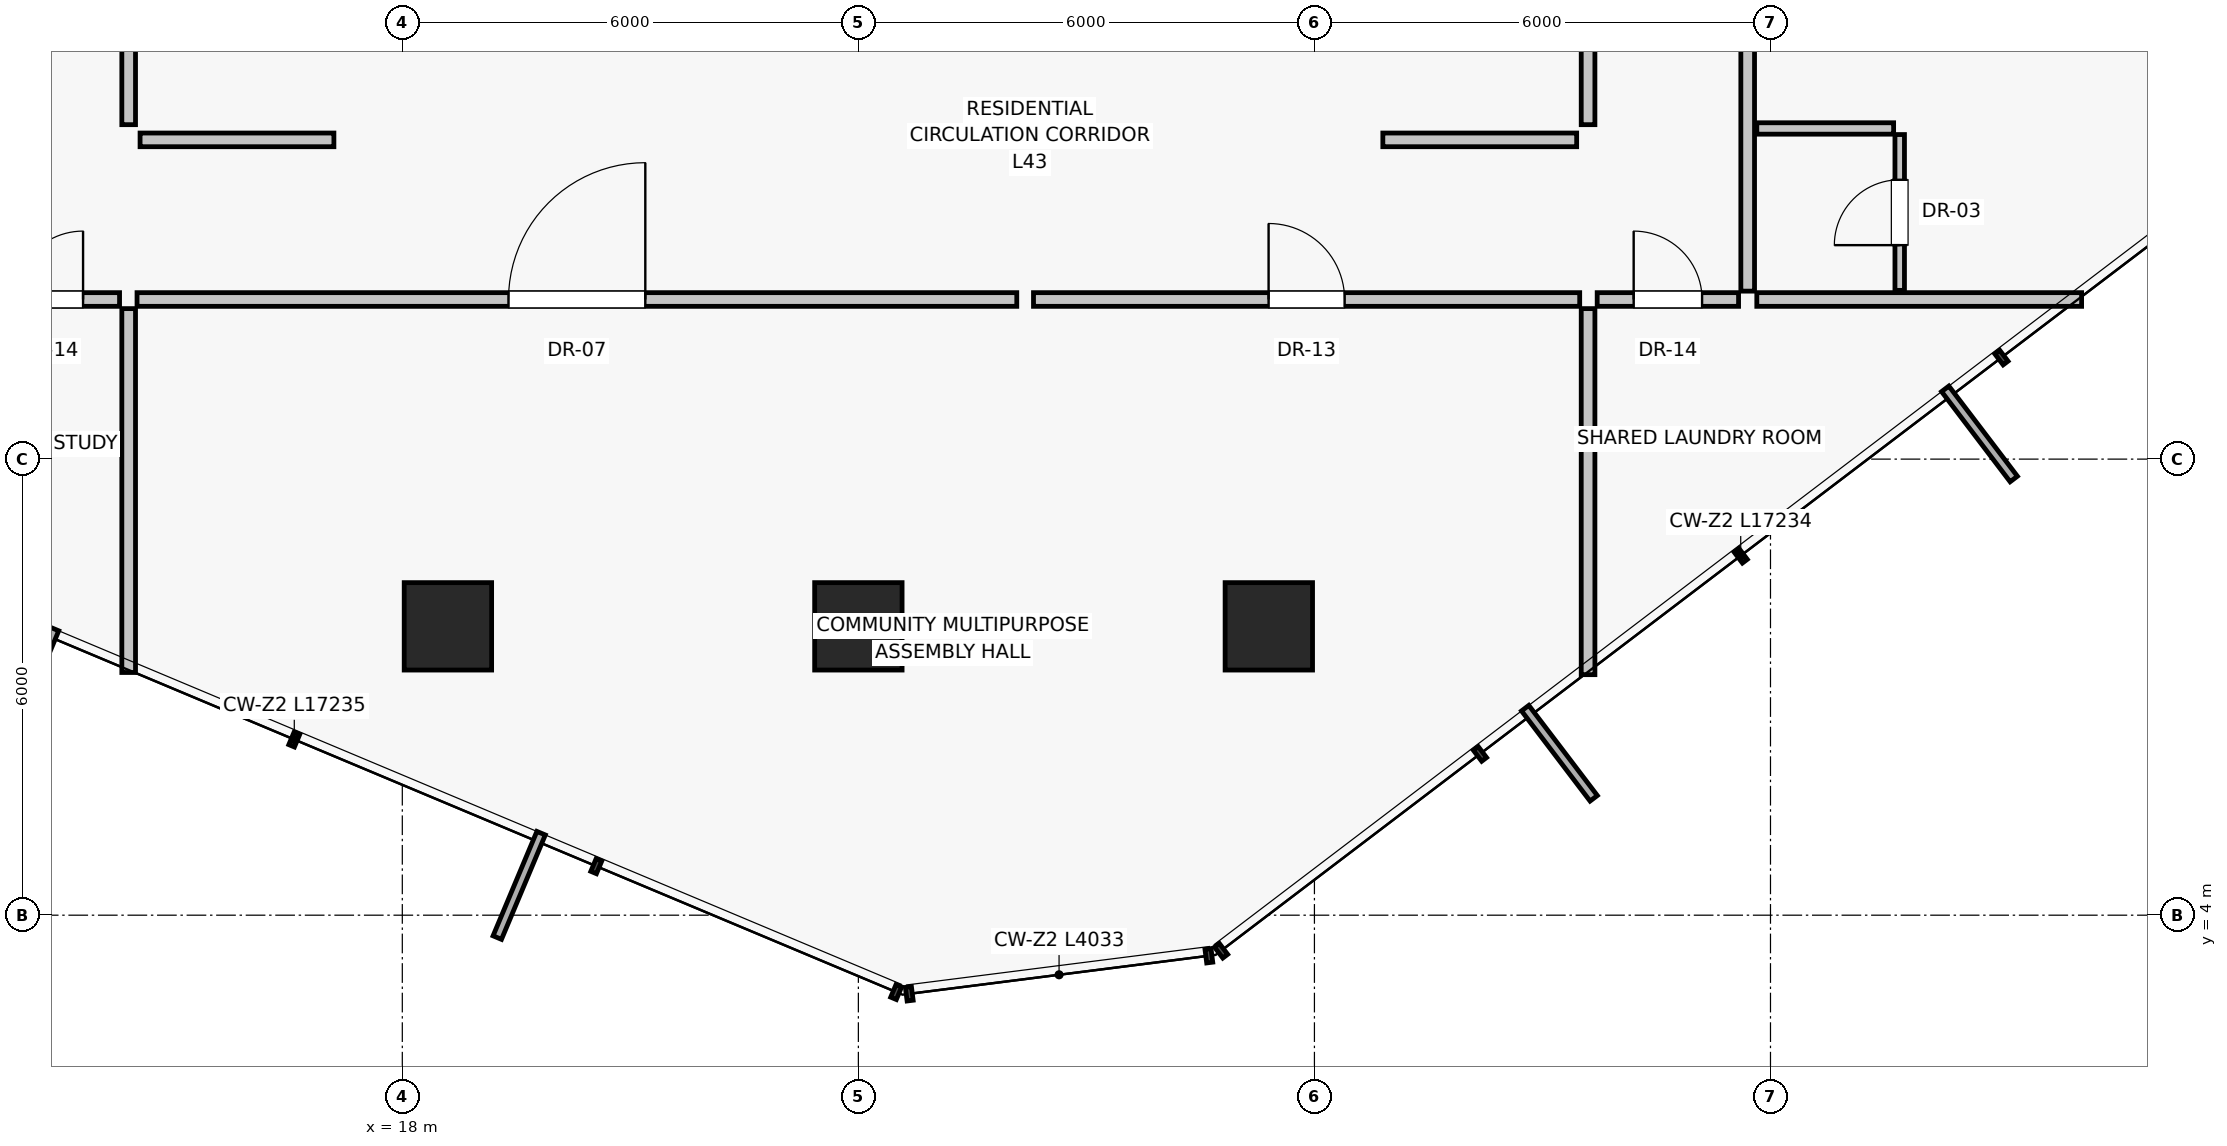
"""IFC4 building model, lengths in metres.
Left out: names, types, materials, properties, quantities, classifications, styles, units other than length and angle.
Written with IfcOpenShell. Run it as: python <this file> out.ifc"""

import sys

from ifc_helpers import new_model, si_unit, direction, frame, frame_2d, origin, origin_2d, place, context, subcontext, project, spatial, rectangle, extrude, source, transform, mapped, element, fill, save


model = new_model("IFC4")
c1 = context("Model", 3, precision=1e-05, world=origin(), true_north=direction((0.0, 1.0)))
c2 = subcontext(c1, "Body", "Model", "MODEL_VIEW")
j1 = project(units=[si_unit("LENGTHUNIT", "METRE"), si_unit("PLANEANGLEUNIT", "RADIAN")], contexts=[c1])
p1 = place(None, origin())
s1 = spatial("IfcSite", under=j1, at=p1, CompositionType="ELEMENT")
p2 = place(p1, origin())
s2 = spatial("IfcBuilding", under=s1, at=p2, CompositionType="ELEMENT")
p3 = place(p2, frame((0.0, 0.0, 152.25)))
s3 = spatial("IfcBuildingStorey", under=s2, at=p3, CompositionType="ELEMENT", Elevation=152.25)
for number, where, z_axis, x_axis in (
    (1, (18.6, 7.8, 0.0), (0.0, 0.0, 1.0), (1.0, 0.0, 0.0)),
    (2, (24.0, 7.8, 0.0), (0.0, 0.0, 1.0), (1.0, 0.0, 0.0)),
    (3, (29.4, 7.8, 0.0), (0.0, 0.0, 1.0), (1.0, 0.0, 0.0)),
):
    element("IfcColumn", number, at=place(p3, frame(where, z_axis=z_axis, x_axis=x_axis)), inside=s3, PredefinedType="COLUMN", context=c2, shape_type="SweptSolid", body=[
        extrude(rectangle(XDim=1.15, YDim=1.15, at=origin_2d()), origin(), (0.0, 0.0, 1.0), 3.25),
    ])
p4 = place(p3, frame((14.4, 14.4, 0.0), z_axis=(0.0, 0.0, 1.0), x_axis=(0.0, 1.0, 0.0)))
e4 = element("IfcWall", 4, at=p4, inside=s3, PredefinedType="PARTITIONING", context=c2, shape_type="SweptSolid", body=[
    extrude(rectangle(XDim=9.4, YDim=0.18, at=frame_2d((4.7, 0.0))), origin(), (0.0, 0.0, 1.0), 3.0),
])
p5 = place(p4, frame((3.8, 0.0, 0.0)))
e5 = element("IfcOpeningElement", 5, at=p5, cuts=e4, PredefinedType="OPENING", context=c2, shape_type="SweptSolid", body=[
    extrude(rectangle(XDim=0.9, YDim=2.01, at=frame_2d((0.45, 1.005))), frame((0.0, 0.1, 0.0), z_axis=(0.0, -1.0, 0.0), x_axis=(1.0, 0.0, 0.0)), (0.0, 0.0, 1.0), 0.2),
])
p6 = place(p3, frame((33.6, 14.4, 0.0), z_axis=(0.0, 0.0, 1.0), x_axis=(0.0, 1.0, 0.0)))
e6 = element("IfcWall", 6, at=p6, inside=s3, PredefinedType="PARTITIONING", context=c2, shape_type="SweptSolid", body=[
    extrude(rectangle(XDim=9.4, YDim=0.18, at=frame_2d((4.7, 0.0))), origin(), (0.0, 0.0, 1.0), 3.0),
])
p7 = place(p6, frame((3.8, 0.0, 0.0)))
e7 = element("IfcOpeningElement", 7, at=p7, cuts=e6, PredefinedType="OPENING", context=c2, shape_type="SweptSolid", body=[
    extrude(rectangle(XDim=0.9, YDim=2.01, at=frame_2d((0.45, 1.005))), frame((0.0, 0.1, 0.0), z_axis=(0.0, -1.0, 0.0), x_axis=(1.0, 0.0, 0.0)), (0.0, 0.0, 1.0), 0.2),
])
for number, where, z_axis, x_axis in (
    (8, (14.55, 14.2, 0.0), (0.0, 0.0, 1.0), (1.0, 0.0, 0.0)),
    (9, (30.9, 14.2, 0.0), (0.0, 0.0, 1.0), (1.0, 0.0, 0.0)),
):
    element("IfcWall", number, at=place(p3, frame(where, z_axis=z_axis, x_axis=x_axis)), inside=s3, PredefinedType="PARTITIONING", context=c2, shape_type="SweptSolid", body=[
        extrude(rectangle(XDim=2.55, YDim=0.18, at=frame_2d((1.275, 0.0))), origin(), (0.0, 0.0, 1.0), 3.0),
    ])
p8 = place(p3, frame((14.4, 11.98, 0.0), z_axis=(0.0, 0.0, 1.0), x_axis=(0.0, -1.0, 0.0)))
e10 = element("IfcWall", 10, at=p8, inside=s3, PredefinedType="PARTITIONING", context=c2, shape_type="SweptSolid", body=[
    extrude(rectangle(XDim=4.787, YDim=0.18, at=frame_2d((2.394, 0.0))), origin(), (0.0, 0.0, 1.0), 3.0),
])
p9 = place(p3, frame((33.6, 11.98, 0.0), z_axis=(0.0, 0.0, 1.0), x_axis=(0.0, -1.0, 0.0)))
e11 = element("IfcWall", 11, at=p9, inside=s3, PredefinedType="PARTITIONING", context=c2, shape_type="SweptSolid", body=[
    extrude(rectangle(XDim=4.816, YDim=0.18, at=frame_2d((2.408, 0.0))), origin(), (0.0, 0.0, 1.0), 3.0),
])
p10 = place(p3, frame((14.51, 12.1, 0.0), z_axis=(0.0, 0.0, 1.0), x_axis=(1.0, 0.0, 0.0)))
e12 = element("IfcWall", 12, at=p10, inside=s3, PredefinedType="PARTITIONING", context=c2, shape_type="SweptSolid", body=[
    extrude(rectangle(XDim=11.574, YDim=0.18, at=frame_2d((5.787, 0.0))), origin(), (0.0, 0.0, 1.0), 2.58),
])
p11 = place(p10, frame((4.887, 0.0, 0.0)))
e13 = element("IfcOpeningElement", 13, at=p11, cuts=e12, PredefinedType="OPENING", context=c2, shape_type="SweptSolid", body=[
    extrude(rectangle(XDim=1.8, YDim=2.25, at=frame_2d((0.9, 1.125))), frame((0.0, 0.1, 0.0), z_axis=(0.0, -1.0, 0.0), x_axis=(1.0, 0.0, 0.0)), (0.0, 0.0, 1.0), 0.2),
])
p12 = place(p3, frame((26.304, 12.1, 0.0), z_axis=(0.0, 0.0, 1.0), x_axis=(1.0, 0.0, 0.0)))
e14 = element("IfcWall", 14, at=p12, inside=s3, PredefinedType="PARTITIONING", context=c2, shape_type="SweptSolid", body=[
    extrude(rectangle(XDim=7.186, YDim=0.18, at=frame_2d((3.593, 0.0))), origin(), (0.0, 0.0, 1.0), 2.58),
])
p13 = place(p12, frame((3.093, 0.0, 0.0)))
e15 = element("IfcOpeningElement", 15, at=p13, cuts=e14, PredefinedType="OPENING", context=c2, shape_type="SweptSolid", body=[
    extrude(rectangle(XDim=1.0, YDim=2.01, at=frame_2d((0.5, 1.005))), frame((0.0, 0.1, 0.0), z_axis=(0.0, -1.0, 0.0), x_axis=(1.0, 0.0, 0.0)), (0.0, 0.0, 1.0), 0.2),
])
p14 = place(p3, frame((35.82, 12.1, 0.0), z_axis=(0.0, 0.0, 1.0), x_axis=(1.0, 0.0, 0.0)))
e16 = element("IfcWall", 16, at=p14, inside=s3, PredefinedType="PARTITIONING", context=c2, shape_type="SweptSolid", body=[
    extrude(rectangle(XDim=4.273, YDim=0.18, at=frame_2d((2.136, 0.0))), origin(), (0.0, 0.0, 1.0), 3.0),
])
p15 = place(p3, frame((35.7, 12.21, 0.0), z_axis=(0.0, 0.0, 1.0), x_axis=(0.0, 1.0, 0.0)))
e17 = element("IfcWall", 17, at=p15, inside=s3, PredefinedType="PARTITIONING", context=c2, shape_type="SweptSolid", body=[
    extrude(rectangle(XDim=14.082, YDim=0.18, at=frame_2d((7.041, 0.0))), origin(), (0.0, 0.0, 1.0), 2.58),
])
p16 = place(p15, frame((4.544, 0.0, 0.0)))
e18 = element("IfcOpeningElement", 18, at=p16, cuts=e17, PredefinedType="OPENING", context=c2, shape_type="SweptSolid", body=[
    extrude(rectangle(XDim=0.95, YDim=2.02, at=frame_2d((0.475, 1.01))), frame((0.0, 0.1, 0.0), z_axis=(0.0, -1.0, 0.0), x_axis=(1.0, 0.0, 0.0)), (0.0, 0.0, 1.0), 0.2),
])
p17 = place(p3, frame((35.82, 14.35, 0.0), z_axis=(0.0, 0.0, 1.0), x_axis=(1.0, 0.0, 0.0)))
e19 = element("IfcWall", 19, at=p17, inside=s3, PredefinedType="PARTITIONING", context=c2, shape_type="SweptSolid", body=[
    extrude(rectangle(XDim=1.8, YDim=0.15, at=frame_2d((0.9, 0.0))), origin(), (0.0, 0.0, 1.0), 3.0),
])
p18 = place(p3, frame((37.7, 12.22, 0.0), z_axis=(0.0, 0.0, 1.0), x_axis=(0.0, 1.0, 0.0)))
e20 = element("IfcWall", 20, at=p18, inside=s3, PredefinedType="PARTITIONING", context=c2, shape_type="SweptSolid", body=[
    extrude(rectangle(XDim=2.05, YDim=0.125, at=frame_2d((1.025, 0.0))), origin(), (0.0, 0.0, 1.0), 3.0),
])
p19 = place(p18, frame((0.595, 0.0, 0.0)))
e21 = element("IfcOpeningElement", 21, at=p19, cuts=e20, PredefinedType="OPENING", context=c2, shape_type="SweptSolid", body=[
    extrude(rectangle(XDim=0.86, YDim=2.01, at=frame_2d((0.43, 1.005))), frame((0.0, 0.073, 0.0), z_axis=(0.0, -1.0, 0.0), x_axis=(1.0, 0.0, 0.0)), (0.0, 0.0, 1.0), 0.145),
])
p20 = place(p3, frame((12.42, 12.1, 0.0), z_axis=(0.0, 0.0, 1.0), x_axis=(1.0, 0.0, 0.0)))
e22 = element("IfcWall", 22, at=p20, inside=s3, PredefinedType="PARTITIONING", context=c2, shape_type="SweptSolid", body=[
    extrude(rectangle(XDim=1.86, YDim=0.18, at=frame_2d((0.93, 0.0))), origin(), (0.0, 0.0, 1.0), 3.0),
])
p21 = place(p20, frame((0.48, 0.0, 0.0)))
e23 = element("IfcOpeningElement", 23, at=p21, cuts=e22, PredefinedType="OPENING", context=c2, shape_type="SweptSolid", body=[
    extrude(rectangle(XDim=0.9, YDim=2.01, at=frame_2d((0.45, 1.005))), frame((0.0, 0.1, 0.0), z_axis=(0.0, -1.0, 0.0), x_axis=(1.0, 0.0, 0.0)), (0.0, 0.0, 1.0), 0.2),
])
p22 = place(p3, frame((33.72, 12.1, 0.0), z_axis=(0.0, 0.0, 1.0), x_axis=(1.0, 0.0, 0.0)))
e24 = element("IfcWall", 24, at=p22, inside=s3, PredefinedType="PARTITIONING", context=c2, shape_type="SweptSolid", body=[
    extrude(rectangle(XDim=1.86, YDim=0.18, at=frame_2d((0.93, 0.0))), origin(), (0.0, 0.0, 1.0), 3.0),
])
p23 = place(p22, frame((0.48, 0.0, 0.0)))
e25 = element("IfcOpeningElement", 25, at=p23, cuts=e24, PredefinedType="OPENING", context=c2, shape_type="SweptSolid", body=[
    extrude(rectangle(XDim=0.9, YDim=2.01, at=frame_2d((0.45, 1.005))), frame((0.0, 0.1, 0.0), z_axis=(0.0, -1.0, 0.0), x_axis=(1.0, 0.0, 0.0)), (0.0, 0.0, 1.0), 0.2),
])
m1 = source(origin(), c2, "Body", "SweptSolid", [
    extrude(rectangle(XDim=1.8, YDim=2.25, at=frame_2d((0.9, 1.125))), frame((0.0, 0.025, 0.0), z_axis=(0.0, -1.0, 0.0), x_axis=(1.0, 0.0, 0.0)), (0.0, 0.0, 1.0), 0.05),
])
p24 = place(p11, origin())
e26 = element("IfcDoor", 26, at=p24, inside=s3, OperationType="SINGLE_SWING_RIGHT", PredefinedType="DOOR", context=c2, shape_type="MappedRepresentation", body=[
    mapped(m1, transform((0.0, 0.0, 0.0), scale=1.0)),
])
fill(e13, e26)
m2 = source(origin(), c2, "Body", "SweptSolid", [
    extrude(rectangle(XDim=1.0, YDim=2.01, at=frame_2d((0.5, 1.005))), frame((0.0, 0.025, 0.0), z_axis=(0.0, -1.0, 0.0), x_axis=(1.0, 0.0, 0.0)), (0.0, 0.0, 1.0), 0.05),
])
p25 = place(p13, origin())
e27 = element("IfcDoor", 27, at=p25, inside=s3, OperationType="SINGLE_SWING_LEFT", PredefinedType="DOOR", context=c2, shape_type="MappedRepresentation", body=[
    mapped(m2, transform((0.0, 0.0, 0.0), scale=1.0)),
])
fill(e15, e27)
m3 = source(origin(), c2, "Body", "SweptSolid", [
    extrude(rectangle(XDim=0.86, YDim=2.01, at=frame_2d((0.43, 1.005))), frame((0.0, 0.025, 0.0), z_axis=(0.0, -1.0, 0.0), x_axis=(1.0, 0.0, 0.0)), (0.0, 0.0, 1.0), 0.05),
])
p26 = place(p19, origin())
e28 = element("IfcDoor", 28, at=p26, inside=s3, OperationType="SINGLE_SWING_LEFT", PredefinedType="DOOR", context=c2, shape_type="MappedRepresentation", body=[
    mapped(m3, transform((0.0, 0.0, 0.0), scale=1.0)),
])
fill(e21, e28)
m4 = source(origin(), c2, "Body", "SweptSolid", [
    extrude(rectangle(XDim=0.9, YDim=2.01, at=frame_2d((0.45, 1.005))), frame((0.0, 0.025, 0.0), z_axis=(0.0, -1.0, 0.0), x_axis=(1.0, 0.0, 0.0)), (0.0, 0.0, 1.0), 0.05),
])
p27 = place(p21, origin())
e29 = element("IfcDoor", 29, at=p27, inside=s3, OperationType="SINGLE_SWING_RIGHT", PredefinedType="DOOR", context=c2, shape_type="MappedRepresentation", body=[
    mapped(m4, transform((0.0, 0.0, 0.0), scale=1.0)),
])
fill(e23, e29)
p28 = place(p23, origin())
e30 = element("IfcDoor", 30, at=p28, inside=s3, OperationType="SINGLE_SWING_LEFT", PredefinedType="DOOR", context=c2, shape_type="MappedRepresentation", body=[
    mapped(m4, transform((0.0, 0.0, 0.0), scale=1.0)),
])
fill(e25, e30)
save(model, sys.argv[1])
